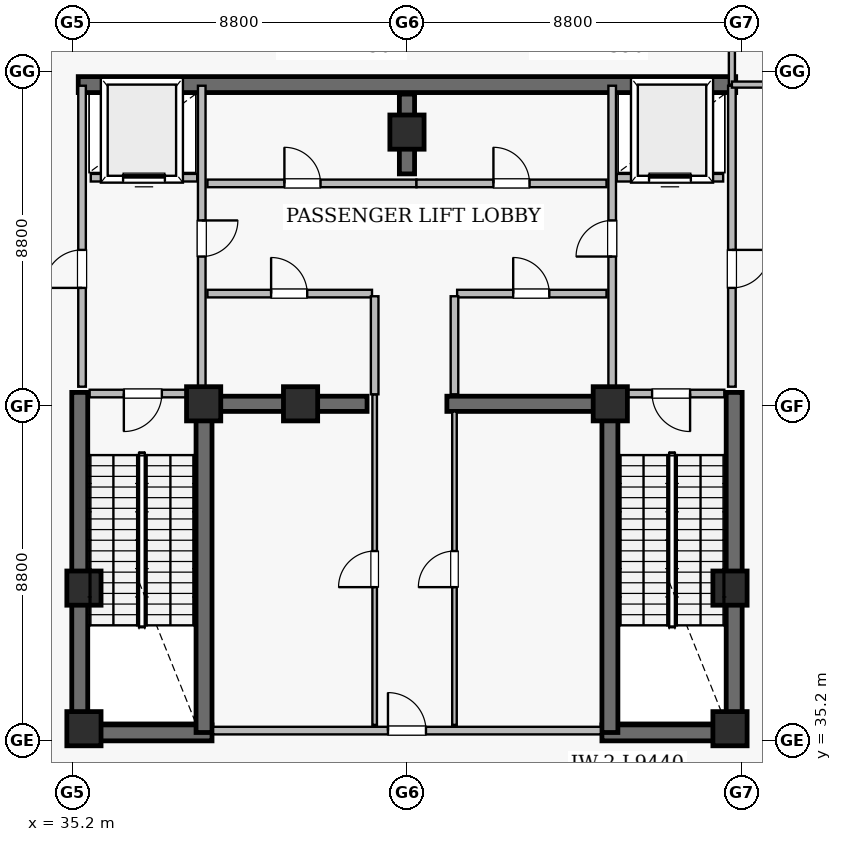
"""IFC4 building model, lengths in metres.
Left out: names, types, materials, properties, quantities, classifications, styles, units other than length and angle.
Written with IfcOpenShell. Run it as: python <this file> out.ifc"""

import sys

from ifc_helpers import new_model, si_unit, direction, frame, frame_2d, origin, origin_2d, place, context, subcontext, project, spatial, rectangle, extrude, element, fill, save


model = new_model("IFC4")
c1 = context("Model", 3, precision=1e-05, world=origin(), true_north=direction((0.0, 1.0)))
c2 = subcontext(c1, "Body", "Model", "MODEL_VIEW")
j1 = project(units=[si_unit("LENGTHUNIT", "METRE"), si_unit("PLANEANGLEUNIT", "RADIAN")], contexts=[c1])
p1 = place(None, origin())
s1 = spatial("IfcSite", under=j1, at=p1, CompositionType="ELEMENT")
p2 = place(p1, origin())
s2 = spatial("IfcBuilding", under=s1, at=p2, CompositionType="ELEMENT")
p3 = place(p2, frame((0.0, 0.0, 306.8)))
s3 = spatial("IfcBuildingStorey", under=s2, at=p3, CompositionType="ELEMENT", Elevation=306.8)
p4 = place(p3, frame((35.35, 52.45, 0.0), z_axis=(0.0, 0.0, 1.0), x_axis=(1.0, 0.0, 0.0)))
e1 = element("IfcWall", 1, at=p4, inside=s3, PredefinedType="SHEAR", context=c2, shape_type="SweptSolid", body=[
    extrude(rectangle(XDim=17.3, YDim=0.42, at=frame_2d((8.65, 0.0))), origin(), (0.0, 0.0, 1.0), 5.74),
])
for number, where, z_axis, x_axis in (
    (2, (35.18, 35.39, 0.0), (0.0, 0.0, 1.0), (1.0, 0.0, 0.0)),
    (3, (49.13, 35.39, 0.0), (0.0, 0.0, 1.0), (1.0, 0.0, 0.0)),
):
    element("IfcWall", number, at=place(p3, frame(where, z_axis=z_axis, x_axis=x_axis)), inside=s3, PredefinedType="SHEAR", context=c2, shape_type="SweptSolid", body=[
        extrude(rectangle(XDim=3.69, YDim=0.42, at=frame_2d((1.845, 0.0))), origin(), (0.0, 0.0, 1.0), 5.74),
    ])
for number, where, z_axis, x_axis in (
    (4, (35.39, 35.18, 0.0), (0.0, 0.0, 1.0), (0.0, 1.0, 0.0)),
    (5, (52.61, 35.18, 0.0), (0.0, 0.0, 1.0), (0.0, 1.0, 0.0)),
):
    element("IfcWall", number, at=place(p3, frame(where, z_axis=z_axis, x_axis=x_axis)), inside=s3, PredefinedType="SHEAR", context=c2, shape_type="SweptSolid", body=[
        extrude(rectangle(XDim=9.17, YDim=0.42, at=frame_2d((4.585, 0.0))), origin(), (0.0, 0.0, 1.0), 5.74),
    ])
for number, where, z_axis, x_axis in (
    (6, (38.66, 35.4, 0.0), (0.0, 0.0, 1.0), (0.0, 1.0, 0.0)),
    (7, (49.34, 35.4, 0.0), (0.0, 0.0, 1.0), (0.0, 1.0, 0.0)),
):
    element("IfcWall", number, at=place(p3, frame(where, z_axis=z_axis, x_axis=x_axis)), inside=s3, PredefinedType="SHEAR", context=c2, shape_type="SweptSolid", body=[
        extrude(rectangle(XDim=8.95, YDim=0.42, at=frame_2d((4.475, 0.0))), origin(), (0.0, 0.0, 1.0), 5.74),
    ])
p5 = place(p3, frame((44.0, 50.1, 0.0), z_axis=(0.0, 0.0, 1.0), x_axis=(0.0, 1.0, 0.0)))
e8 = element("IfcWall", 8, at=p5, inside=s3, PredefinedType="SHEAR", context=c2, shape_type="SweptSolid", body=[
    extrude(rectangle(XDim=2.1, YDim=0.4, at=frame_2d((1.05, 0.0))), origin(), (0.0, 0.0, 1.0), 5.74),
])
for number, where, z_axis, x_axis in (
    (9, (38.75, 44.05, 0.0), (0.0, 0.0, 1.0), (1.0, 0.0, 0.0)),
    (10, (45.05, 44.05, 0.0), (0.0, 0.0, 1.0), (1.0, 0.0, 0.0)),
):
    element("IfcWall", number, at=place(p3, frame(where, z_axis=z_axis, x_axis=x_axis)), inside=s3, PredefinedType="SHEAR", context=c2, shape_type="SweptSolid", body=[
        extrude(rectangle(XDim=4.2, YDim=0.4, at=frame_2d((2.1, 0.0))), origin(), (0.0, 0.0, 1.0), 5.74),
    ])
for number, where, z_axis, x_axis in (
    (11, (35.5, 35.5, 0.0), (0.0, 0.0, 1.0), (1.0, 0.0, 0.0)),
    (12, (38.65, 44.05, 0.0), (0.0, 0.0, 1.0), (1.0, 0.0, 0.0)),
    (13, (52.5, 35.5, 0.0), (0.0, 0.0, 1.0), (1.0, 0.0, 0.0)),
    (14, (52.5, 39.2, 0.0), (0.0, 0.0, 1.0), (1.0, 0.0, 0.0)),
    (15, (49.35, 44.05, 0.0), (0.0, 0.0, 1.0), (1.0, 0.0, 0.0)),
    (16, (44.0, 51.2, 0.0), (0.0, 0.0, 1.0), (1.0, 0.0, 0.0)),
    (17, (35.5, 39.2, 0.0), (0.0, 0.0, 1.0), (1.0, 0.0, 0.0)),
    (18, (41.2, 44.05, 0.0), (0.0, 0.0, 1.0), (1.0, 0.0, 0.0)),
):
    element("IfcColumn", number, at=place(p3, frame(where, z_axis=z_axis, x_axis=x_axis)), inside=s3, PredefinedType="COLUMN", context=c2, shape_type="SweptSolid", body=[
        extrude(rectangle(XDim=0.9, YDim=0.9, at=origin_2d()), origin(), (0.0, 0.0, 1.0), 6.0),
    ])
p6 = place(p3, frame((38.9, 35.45, 0.0), z_axis=(0.0, 0.0, 1.0), x_axis=(1.0, 0.0, 0.0)))
e19 = element("IfcWall", 19, at=p6, inside=s3, PredefinedType="SOLIDWALL", context=c2, shape_type="SweptSolid", body=[
    extrude(rectangle(XDim=10.2, YDim=0.2, at=frame_2d((5.1, 0.0))), origin(), (0.0, 0.0, 1.0), 5.74),
])
p7 = place(p6, frame((4.6, 0.0, 0.0)))
e20 = element("IfcOpeningElement", 20, at=p7, cuts=e19, PredefinedType="OPENING", context=c2, shape_type="SweptSolid", body=[
    extrude(rectangle(XDim=1.0, YDim=2.15, at=frame_2d((0.5, 1.075))), frame((0.0, 0.11, 0.0), z_axis=(0.0, -1.0, 0.0), x_axis=(1.0, 0.0, 0.0)), (0.0, 0.0, 1.0), 0.22),
])
p8 = place(p3, frame((43.15, 35.6, 0.0), z_axis=(0.0, 0.0, 1.0), x_axis=(0.0, 1.0, 0.0)))
e21 = element("IfcWall", 21, at=p8, inside=s3, PredefinedType="PARTITIONING", context=c2, shape_type="SweptSolid", body=[
    extrude(rectangle(XDim=8.7, YDim=0.12, at=frame_2d((4.35, 0.0))), origin(), (0.0, 0.0, 1.0), 5.74),
])
p9 = place(p8, frame((3.625, 0.0, 0.0)))
e22 = element("IfcOpeningElement", 22, at=p9, cuts=e21, PredefinedType="OPENING", context=c2, shape_type="SweptSolid", body=[
    extrude(rectangle(XDim=0.95, YDim=2.1, at=frame_2d((0.475, 1.05))), frame((0.0, 0.07, 0.0), z_axis=(0.0, -1.0, 0.0), x_axis=(1.0, 0.0, 0.0)), (0.0, 0.0, 1.0), 0.14),
])
p10 = place(p3, frame((45.25, 35.6, 0.0), z_axis=(0.0, 0.0, 1.0), x_axis=(0.0, 1.0, 0.0)))
e23 = element("IfcWall", 23, at=p10, inside=s3, PredefinedType="PARTITIONING", context=c2, shape_type="SweptSolid", body=[
    extrude(rectangle(XDim=8.25, YDim=0.12, at=frame_2d((4.125, 0.0))), origin(), (0.0, 0.0, 1.0), 5.74),
])
p11 = place(p10, frame((3.625, 0.0, 0.0)))
e24 = element("IfcOpeningElement", 24, at=p11, cuts=e23, PredefinedType="OPENING", context=c2, shape_type="SweptSolid", body=[
    extrude(rectangle(XDim=0.95, YDim=2.1, at=frame_2d((0.475, 1.05))), frame((0.0, 0.07, 0.0), z_axis=(0.0, -1.0, 0.0), x_axis=(1.0, 0.0, 0.0)), (0.0, 0.0, 1.0), 0.14),
])
p12 = place(p3, frame((35.45, 44.5, 0.0), z_axis=(0.0, 0.0, 1.0), x_axis=(0.0, 1.0, 0.0)))
e25 = element("IfcWall", 25, at=p12, inside=s3, PredefinedType="SOLIDWALL", context=c2, shape_type="SweptSolid", body=[
    extrude(rectangle(XDim=7.92, YDim=0.2, at=frame_2d((3.96, 0.0))), origin(), (0.0, 0.0, 1.0), 5.74),
])
p13 = place(p12, frame((2.6, 0.0, 0.0)))
e26 = element("IfcOpeningElement", 26, at=p13, cuts=e25, PredefinedType="OPENING", context=c2, shape_type="SweptSolid", body=[
    extrude(rectangle(XDim=1.0, YDim=2.15, at=frame_2d((0.5, 1.075))), frame((0.0, 0.11, 0.0), z_axis=(0.0, -1.0, 0.0), x_axis=(1.0, 0.0, 0.0)), (0.0, 0.0, 1.0), 0.22),
])
p14 = place(p3, frame((52.55, 44.5, 0.0), z_axis=(0.0, 0.0, 1.0), x_axis=(0.0, 1.0, 0.0)))
e27 = element("IfcWall", 27, at=p14, inside=s3, PredefinedType="SOLIDWALL", context=c2, shape_type="SweptSolid", body=[
    extrude(rectangle(XDim=7.92, YDim=0.2, at=frame_2d((3.96, 0.0))), origin(), (0.0, 0.0, 1.0), 5.74),
])
p15 = place(p14, frame((2.6, 0.0, 0.0)))
e28 = element("IfcOpeningElement", 28, at=p15, cuts=e27, PredefinedType="OPENING", context=c2, shape_type="SweptSolid", body=[
    extrude(rectangle(XDim=1.0, YDim=2.15, at=frame_2d((0.5, 1.075))), frame((0.0, 0.11, 0.0), z_axis=(0.0, -1.0, 0.0), x_axis=(1.0, 0.0, 0.0)), (0.0, 0.0, 1.0), 0.22),
])
p16 = place(p3, frame((38.6, 44.5, 0.0), z_axis=(0.0, 0.0, 1.0), x_axis=(0.0, 1.0, 0.0)))
e29 = element("IfcWall", 29, at=p16, inside=s3, PredefinedType="SOLIDWALL", context=c2, shape_type="SweptSolid", body=[
    extrude(rectangle(XDim=7.92, YDim=0.2, at=frame_2d((3.96, 0.0))), origin(), (0.0, 0.0, 1.0), 5.74),
])
p17 = place(p16, frame((3.425, 0.0, 0.0)))
e30 = element("IfcOpeningElement", 30, at=p17, cuts=e29, PredefinedType="OPENING", context=c2, shape_type="SweptSolid", body=[
    extrude(rectangle(XDim=0.95, YDim=2.15, at=frame_2d((0.475, 1.075))), frame((0.0, 0.11, 0.0), z_axis=(0.0, -1.0, 0.0), x_axis=(1.0, 0.0, 0.0)), (0.0, 0.0, 1.0), 0.22),
])
p18 = place(p3, frame((49.4, 44.5, 0.0), z_axis=(0.0, 0.0, 1.0), x_axis=(0.0, 1.0, 0.0)))
e31 = element("IfcWall", 31, at=p18, inside=s3, PredefinedType="SOLIDWALL", context=c2, shape_type="SweptSolid", body=[
    extrude(rectangle(XDim=7.92, YDim=0.2, at=frame_2d((3.96, 0.0))), origin(), (0.0, 0.0, 1.0), 4.828),
])
p19 = place(p18, frame((3.425, 0.0, 0.0)))
e32 = element("IfcOpeningElement", 32, at=p19, cuts=e31, PredefinedType="OPENING", context=c2, shape_type="SweptSolid", body=[
    extrude(rectangle(XDim=0.95, YDim=2.15, at=frame_2d((0.475, 1.075))), frame((0.0, 0.11, 0.0), z_axis=(0.0, -1.0, 0.0), x_axis=(1.0, 0.0, 0.0)), (0.0, 0.0, 1.0), 0.22),
])
p20 = place(p3, frame((38.75, 49.85, 0.0), z_axis=(0.0, 0.0, 1.0), x_axis=(1.0, 0.0, 0.0)))
e33 = element("IfcWall", 33, at=p20, inside=s3, PredefinedType="SOLIDWALL", context=c2, shape_type="SweptSolid", body=[
    extrude(rectangle(XDim=5.5, YDim=0.2, at=frame_2d((2.75, 0.0))), origin(), (0.0, 0.0, 1.0), 5.74),
])
p21 = place(p20, frame((2.025, 0.0, 0.0)))
e34 = element("IfcOpeningElement", 34, at=p21, cuts=e33, PredefinedType="OPENING", context=c2, shape_type="SweptSolid", body=[
    extrude(rectangle(XDim=0.95, YDim=2.15, at=frame_2d((0.475, 1.075))), frame((0.0, 0.11, 0.0), z_axis=(0.0, -1.0, 0.0), x_axis=(1.0, 0.0, 0.0)), (0.0, 0.0, 1.0), 0.22),
])
p22 = place(p3, frame((44.25, 49.85, 0.0), z_axis=(0.0, 0.0, 1.0), x_axis=(1.0, 0.0, 0.0)))
e35 = element("IfcWall", 35, at=p22, inside=s3, PredefinedType="SOLIDWALL", context=c2, shape_type="SweptSolid", body=[
    extrude(rectangle(XDim=5.0, YDim=0.2, at=frame_2d((2.5, 0.0))), origin(), (0.0, 0.0, 1.0), 4.828),
])
p23 = place(p22, frame((2.025, 0.0, 0.0)))
e36 = element("IfcOpeningElement", 36, at=p23, cuts=e35, PredefinedType="OPENING", context=c2, shape_type="SweptSolid", body=[
    extrude(rectangle(XDim=0.95, YDim=2.15, at=frame_2d((0.475, 1.075))), frame((0.0, 0.11, 0.0), z_axis=(0.0, -1.0, 0.0), x_axis=(1.0, 0.0, 0.0)), (0.0, 0.0, 1.0), 0.22),
])
p24 = place(p3, frame((38.75, 46.95, 0.0), z_axis=(0.0, 0.0, 1.0), x_axis=(1.0, 0.0, 0.0)))
e37 = element("IfcWall", 37, at=p24, inside=s3, PredefinedType="SOLIDWALL", context=c2, shape_type="SweptSolid", body=[
    extrude(rectangle(XDim=4.33, YDim=0.2, at=frame_2d((2.165, 0.0))), origin(), (0.0, 0.0, 1.0), 5.74),
])
p25 = place(p24, frame((1.675, 0.0, 0.0)))
e38 = element("IfcOpeningElement", 38, at=p25, cuts=e37, PredefinedType="OPENING", context=c2, shape_type="SweptSolid", body=[
    extrude(rectangle(XDim=0.95, YDim=2.1, at=frame_2d((0.475, 1.05))), frame((0.0, 0.11, 0.0), z_axis=(0.0, -1.0, 0.0), x_axis=(1.0, 0.0, 0.0)), (0.0, 0.0, 1.0), 0.22),
])
p26 = place(p3, frame((45.32, 46.95, 0.0), z_axis=(0.0, 0.0, 1.0), x_axis=(1.0, 0.0, 0.0)))
e39 = element("IfcWall", 39, at=p26, inside=s3, PredefinedType="SOLIDWALL", context=c2, shape_type="SweptSolid", body=[
    extrude(rectangle(XDim=3.93, YDim=0.2, at=frame_2d((1.965, 0.0))), origin(), (0.0, 0.0, 1.0), 4.828),
])
p27 = place(p26, frame((1.475, 0.0, 0.0)))
e40 = element("IfcOpeningElement", 40, at=p27, cuts=e39, PredefinedType="OPENING", context=c2, shape_type="SweptSolid", body=[
    extrude(rectangle(XDim=0.95, YDim=2.1, at=frame_2d((0.475, 1.05))), frame((0.0, 0.11, 0.0), z_axis=(0.0, -1.0, 0.0), x_axis=(1.0, 0.0, 0.0)), (0.0, 0.0, 1.0), 0.22),
])
p28 = place(p3, frame((35.65, 44.32, 0.0), z_axis=(0.0, 0.0, 1.0), x_axis=(1.0, 0.0, 0.0)))
e41 = element("IfcWall", 41, at=p28, inside=s3, PredefinedType="SOLIDWALL", context=c2, shape_type="SweptSolid", body=[
    extrude(rectangle(XDim=2.8, YDim=0.2, at=frame_2d((1.4, 0.0))), origin(), (0.0, 0.0, 1.0), 5.74),
])
p29 = place(p28, frame((0.9, 0.0, 0.0)))
e42 = element("IfcOpeningElement", 42, at=p29, cuts=e41, PredefinedType="OPENING", context=c2, shape_type="SweptSolid", body=[
    extrude(rectangle(XDim=1.0, YDim=2.15, at=frame_2d((0.5, 1.075))), frame((0.0, 0.11, 0.0), z_axis=(0.0, -1.0, 0.0), x_axis=(1.0, 0.0, 0.0)), (0.0, 0.0, 1.0), 0.22),
])
p30 = place(p3, frame((49.55, 44.32, 0.0), z_axis=(0.0, 0.0, 1.0), x_axis=(1.0, 0.0, 0.0)))
e43 = element("IfcWall", 43, at=p30, inside=s3, PredefinedType="SOLIDWALL", context=c2, shape_type="SweptSolid", body=[
    extrude(rectangle(XDim=2.8, YDim=0.2, at=frame_2d((1.4, 0.0))), origin(), (0.0, 0.0, 1.0), 4.828),
])
p31 = place(p30, frame((0.9, 0.0, 0.0)))
e44 = element("IfcOpeningElement", 44, at=p31, cuts=e43, PredefinedType="OPENING", context=c2, shape_type="SweptSolid", body=[
    extrude(rectangle(XDim=1.0, YDim=2.15, at=frame_2d((0.5, 1.075))), frame((0.0, 0.11, 0.0), z_axis=(0.0, -1.0, 0.0), x_axis=(1.0, 0.0, 0.0)), (0.0, 0.0, 1.0), 0.22),
])
p32 = place(p3, frame((35.68, 50.0, 0.0), z_axis=(0.0, 0.0, 1.0), x_axis=(1.0, 0.0, 0.0)))
e45 = element("IfcWall", 45, at=p32, inside=s3, PredefinedType="SOLIDWALL", context=c2, shape_type="SweptSolid", body=[
    extrude(rectangle(XDim=2.8, YDim=0.2, at=frame_2d((1.4, 0.0))), origin(), (0.0, 0.0, 1.0), 5.74),
])
p33 = place(p32, frame((0.85, 0.0, 0.0)))
e46 = element("IfcOpeningElement", 46, at=p33, cuts=e45, PredefinedType="OPENING", context=c2, shape_type="SweptSolid", body=[
    extrude(rectangle(XDim=1.1, YDim=2.15, at=frame_2d((0.55, 1.075))), frame((0.0, 0.11, 0.0), z_axis=(0.0, -1.0, 0.0), x_axis=(1.0, 0.0, 0.0)), (0.0, 0.0, 1.0), 0.22),
])
p34 = place(p3, frame((49.52, 50.0, 0.0), z_axis=(0.0, 0.0, 1.0), x_axis=(1.0, 0.0, 0.0)))
e47 = element("IfcWall", 47, at=p34, inside=s3, PredefinedType="SOLIDWALL", context=c2, shape_type="SweptSolid", body=[
    extrude(rectangle(XDim=2.8, YDim=0.2, at=frame_2d((1.4, 0.0))), origin(), (0.0, 0.0, 1.0), 5.74),
])
p35 = place(p34, frame((0.85, 0.0, 0.0)))
e48 = element("IfcOpeningElement", 48, at=p35, cuts=e47, PredefinedType="OPENING", context=c2, shape_type="SweptSolid", body=[
    extrude(rectangle(XDim=1.1, YDim=2.15, at=frame_2d((0.55, 1.075))), frame((0.0, 0.11, 0.0), z_axis=(0.0, -1.0, 0.0), x_axis=(1.0, 0.0, 0.0)), (0.0, 0.0, 1.0), 0.22),
])
for number, where, z_axis, x_axis in (
    (49, (43.15, 44.3, 0.0), (0.0, 0.0, 1.0), (0.0, 1.0, 0.0)),
    (50, (45.25, 44.3, 0.0), (0.0, 0.0, 1.0), (0.0, 1.0, 0.0)),
):
    element("IfcWall", number, at=place(p3, frame(where, z_axis=z_axis, x_axis=x_axis)), inside=s3, PredefinedType="SOLIDWALL", context=c2, shape_type="SweptSolid", body=[
        extrude(rectangle(XDim=2.58, YDim=0.2, at=frame_2d((1.29, 0.0))), origin(), (0.0, 0.0, 1.0), 5.74),
    ])
p36 = place(p3, frame((52.55, 52.45, 0.0), z_axis=(0.0, 0.0, 1.0), x_axis=(0.0, 1.0, 0.0)))
e51 = element("IfcWall", 51, at=p36, inside=s3, PredefinedType="SOLIDWALL", context=c2, shape_type="SweptSolid", body=[
    extrude(rectangle(XDim=2.15, YDim=0.16, at=frame_2d((1.075, 0.0))), origin(), (0.0, 0.0, 1.0), 4.828),
])
p37 = place(p3, frame((54.52, 52.45, 0.0), z_axis=(0.0, 0.0, 1.0), x_axis=(-1.0, 0.0, 0.0)))
e52 = element("IfcWall", 52, at=p37, inside=s3, PredefinedType="SOLIDWALL", context=c2, shape_type="SweptSolid", body=[
    extrude(rectangle(XDim=1.97, YDim=0.16, at=frame_2d((0.985, 0.0))), origin(), (0.0, 0.0, 1.0), 4.828),
])
p38 = place(p29, frame((1.0, 0.0, 0.0), z_axis=(0.0, 0.0, 1.0), x_axis=(-1.0, 0.0, 0.0)))
e53 = element("IfcDoor", 53, at=p38, inside=s3, OperationType="SINGLE_SWING_LEFT", PredefinedType="DOOR", context=c2, shape_type="SweptSolid", body=[
    extrude(rectangle(XDim=1.0, YDim=2.15, at=frame_2d((0.5, 1.075))), frame((0.0, 0.025, 0.0), z_axis=(0.0, -1.0, 0.0), x_axis=(1.0, 0.0, 0.0)), (0.0, 0.0, 1.0), 0.05),
])
fill(e42, e53)
p39 = place(p31, frame((1.0, 0.0, 0.0), z_axis=(0.0, 0.0, 1.0), x_axis=(-1.0, 0.0, 0.0)))
e54 = element("IfcDoor", 54, at=p39, inside=s3, OperationType="SINGLE_SWING_RIGHT", PredefinedType="DOOR", context=c2, shape_type="SweptSolid", body=[
    extrude(rectangle(XDim=1.0, YDim=2.15, at=frame_2d((0.5, 1.075))), frame((0.0, 0.025, 0.0), z_axis=(0.0, -1.0, 0.0), x_axis=(1.0, 0.0, 0.0)), (0.0, 0.0, 1.0), 0.05),
])
fill(e44, e54)
p40 = place(p13, origin())
e55 = element("IfcDoor", 55, at=p40, inside=s3, OperationType="SINGLE_SWING_LEFT", PredefinedType="DOOR", context=c2, shape_type="SweptSolid", body=[
    extrude(rectangle(XDim=1.0, YDim=2.15, at=frame_2d((0.5, 1.075))), frame((0.0, 0.025, 0.0), z_axis=(0.0, -1.0, 0.0), x_axis=(1.0, 0.0, 0.0)), (0.0, 0.0, 1.0), 0.05),
])
fill(e26, e55)
p41 = place(p15, frame((1.0, 0.0, 0.0), z_axis=(0.0, 0.0, 1.0), x_axis=(-1.0, 0.0, 0.0)))
e56 = element("IfcDoor", 56, at=p41, inside=s3, OperationType="SINGLE_SWING_RIGHT", PredefinedType="DOOR", context=c2, shape_type="SweptSolid", body=[
    extrude(rectangle(XDim=1.0, YDim=2.15, at=frame_2d((0.5, 1.075))), frame((0.0, 0.025, 0.0), z_axis=(0.0, -1.0, 0.0), x_axis=(1.0, 0.0, 0.0)), (0.0, 0.0, 1.0), 0.05),
])
fill(e28, e56)
p42 = place(p17, frame((0.95, 0.0, 0.0), z_axis=(0.0, 0.0, 1.0), x_axis=(-1.0, 0.0, 0.0)))
e57 = element("IfcDoor", 57, at=p42, inside=s3, OperationType="SINGLE_SWING_RIGHT", PredefinedType="DOOR", context=c2, shape_type="SweptSolid", body=[
    extrude(rectangle(XDim=0.95, YDim=2.15, at=frame_2d((0.475, 1.075))), frame((0.0, 0.025, 0.0), z_axis=(0.0, -1.0, 0.0), x_axis=(1.0, 0.0, 0.0)), (0.0, 0.0, 1.0), 0.05),
])
fill(e30, e57)
p43 = place(p19, origin())
e58 = element("IfcDoor", 58, at=p43, inside=s3, OperationType="SINGLE_SWING_LEFT", PredefinedType="DOOR", context=c2, shape_type="SweptSolid", body=[
    extrude(rectangle(XDim=0.95, YDim=2.15, at=frame_2d((0.475, 1.075))), frame((0.0, 0.025, 0.0), z_axis=(0.0, -1.0, 0.0), x_axis=(1.0, 0.0, 0.0)), (0.0, 0.0, 1.0), 0.05),
])
fill(e32, e58)
p44 = place(p33, origin())
e59 = element("IfcDoor", 59, at=p44, inside=s3, OperationType="SLIDING_TO_LEFT", PredefinedType="DOOR", context=c2, shape_type="SweptSolid", body=[
    extrude(rectangle(XDim=1.1, YDim=2.15, at=frame_2d((0.55, 1.075))), frame((0.0, 0.025, 0.0), z_axis=(0.0, -1.0, 0.0), x_axis=(1.0, 0.0, 0.0)), (0.0, 0.0, 1.0), 0.05),
])
fill(e46, e59)
p45 = place(p35, origin())
e60 = element("IfcDoor", 60, at=p45, inside=s3, OperationType="SLIDING_TO_LEFT", PredefinedType="DOOR", context=c2, shape_type="SweptSolid", body=[
    extrude(rectangle(XDim=1.1, YDim=2.15, at=frame_2d((0.55, 1.075))), frame((0.0, 0.025, 0.0), z_axis=(0.0, -1.0, 0.0), x_axis=(1.0, 0.0, 0.0)), (0.0, 0.0, 1.0), 0.05),
])
fill(e48, e60)
p46 = place(p7, origin())
e61 = element("IfcDoor", 61, at=p46, inside=s3, OperationType="SINGLE_SWING_LEFT", PredefinedType="DOOR", context=c2, shape_type="SweptSolid", body=[
    extrude(rectangle(XDim=1.0, YDim=2.15, at=frame_2d((0.5, 1.075))), frame((0.0, 0.025, 0.0), z_axis=(0.0, -1.0, 0.0), x_axis=(1.0, 0.0, 0.0)), (0.0, 0.0, 1.0), 0.05),
])
fill(e20, e61)
p47 = place(p21, origin())
e62 = element("IfcDoor", 62, at=p47, inside=s3, OperationType="SINGLE_SWING_LEFT", PredefinedType="DOOR", context=c2, shape_type="SweptSolid", body=[
    extrude(rectangle(XDim=0.95, YDim=2.15, at=frame_2d((0.475, 1.075))), frame((0.0, 0.025, 0.0), z_axis=(0.0, -1.0, 0.0), x_axis=(1.0, 0.0, 0.0)), (0.0, 0.0, 1.0), 0.05),
])
fill(e34, e62)
p48 = place(p23, origin())
e63 = element("IfcDoor", 63, at=p48, inside=s3, OperationType="SINGLE_SWING_LEFT", PredefinedType="DOOR", context=c2, shape_type="SweptSolid", body=[
    extrude(rectangle(XDim=0.95, YDim=2.15, at=frame_2d((0.475, 1.075))), frame((0.0, 0.025, 0.0), z_axis=(0.0, -1.0, 0.0), x_axis=(1.0, 0.0, 0.0)), (0.0, 0.0, 1.0), 0.05),
])
fill(e36, e63)
p49 = place(p25, origin())
e64 = element("IfcDoor", 64, at=p49, inside=s3, OperationType="SINGLE_SWING_LEFT", PredefinedType="DOOR", context=c2, shape_type="SweptSolid", body=[
    extrude(rectangle(XDim=0.95, YDim=2.1, at=frame_2d((0.475, 1.05))), frame((0.0, 0.025, 0.0), z_axis=(0.0, -1.0, 0.0), x_axis=(1.0, 0.0, 0.0)), (0.0, 0.0, 1.0), 0.05),
])
fill(e38, e64)
p50 = place(p27, origin())
e65 = element("IfcDoor", 65, at=p50, inside=s3, OperationType="SINGLE_SWING_LEFT", PredefinedType="DOOR", context=c2, shape_type="SweptSolid", body=[
    extrude(rectangle(XDim=0.95, YDim=2.1, at=frame_2d((0.475, 1.05))), frame((0.0, 0.025, 0.0), z_axis=(0.0, -1.0, 0.0), x_axis=(1.0, 0.0, 0.0)), (0.0, 0.0, 1.0), 0.05),
])
fill(e40, e65)
p51 = place(p9, origin())
e66 = element("IfcDoor", 66, at=p51, inside=s3, OperationType="SINGLE_SWING_LEFT", PredefinedType="DOOR", context=c2, shape_type="SweptSolid", body=[
    extrude(rectangle(XDim=0.95, YDim=2.1, at=frame_2d((0.475, 1.05))), frame((0.0, 0.025, 0.0), z_axis=(0.0, -1.0, 0.0), x_axis=(1.0, 0.0, 0.0)), (0.0, 0.0, 1.0), 0.05),
])
fill(e22, e66)
p52 = place(p11, origin())
e67 = element("IfcDoor", 67, at=p52, inside=s3, OperationType="SINGLE_SWING_LEFT", PredefinedType="DOOR", context=c2, shape_type="SweptSolid", body=[
    extrude(rectangle(XDim=0.95, YDim=2.1, at=frame_2d((0.475, 1.05))), frame((0.0, 0.025, 0.0), z_axis=(0.0, -1.0, 0.0), x_axis=(1.0, 0.0, 0.0)), (0.0, 0.0, 1.0), 0.05),
])
fill(e24, e67)
save(model, sys.argv[1])
